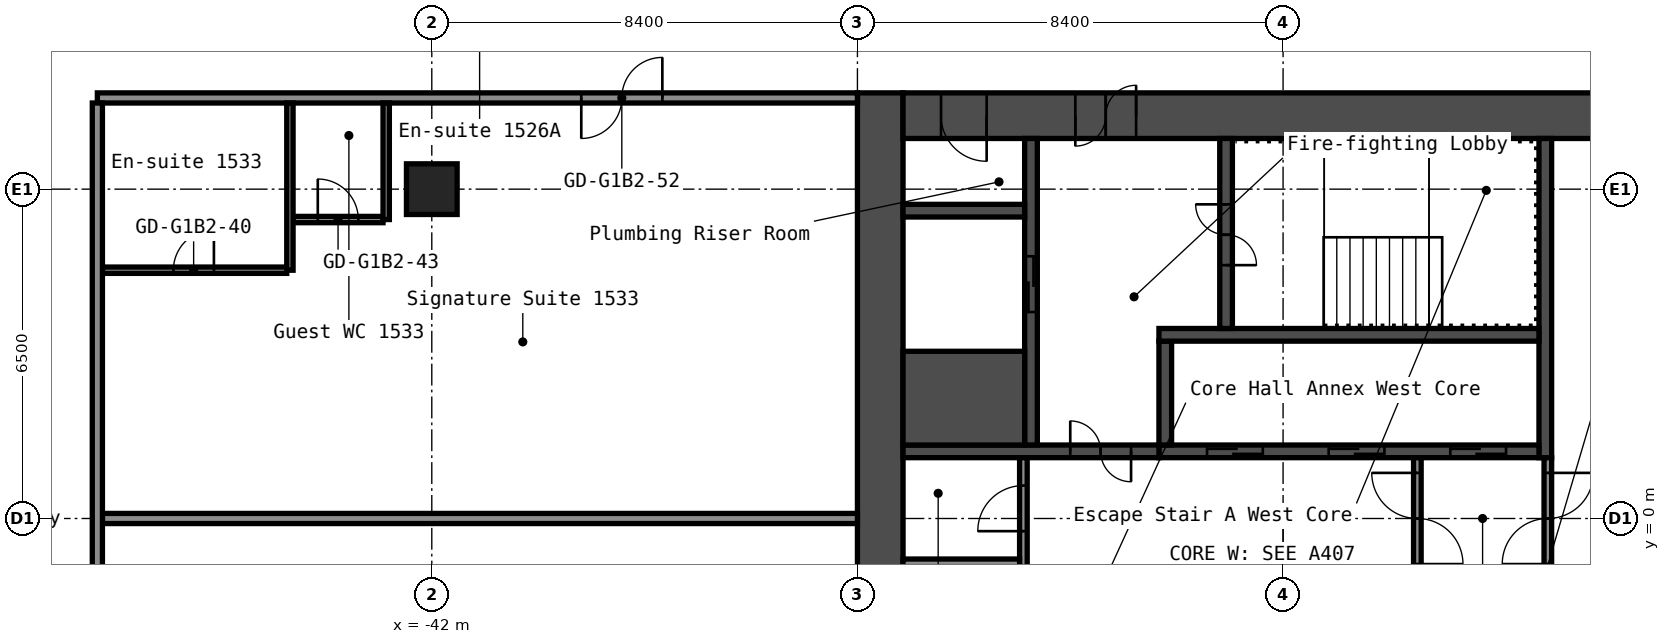
"""IFC4 building model, lengths in metres.
Left out: names, types, materials, properties, quantities, classifications, styles, units other than length and angle.
Written with IfcOpenShell. Run it as: python <this file> out.ifc"""

import sys

from ifc_helpers import new_model, si_unit, direction, frame, frame_2d, origin, origin_2d, place, context, subcontext, project, spatial, rectangle, hollow_rectangle, extrude, element, fill, save


model = new_model("IFC4")
c1 = context("Model", 3, precision=1e-05, world=origin(), true_north=direction((0.0, 1.0)))
c2 = subcontext(c1, "Body", "Model", "MODEL_VIEW")
j1 = project(units=[si_unit("LENGTHUNIT", "METRE"), si_unit("PLANEANGLEUNIT", "RADIAN")], contexts=[c1])
p1 = place(None, origin())
s1 = spatial("IfcSite", under=j1, at=p1, CompositionType="ELEMENT")
p2 = place(p1, origin())
s2 = spatial("IfcBuilding", under=s1, at=p2, CompositionType="ELEMENT")
p3 = place(p2, frame((0.0, 0.0, 55.0)))
s3 = spatial("IfcBuildingStorey", under=s2, at=p3, CompositionType="ELEMENT", Elevation=55.0)
p4 = place(p3, frame((-42.0, 6.5, 0.0), z_axis=(0.0, 0.0, 1.0), x_axis=(1.0, 0.0, 0.0)))
e1 = element("IfcColumn", 1, at=p4, inside=s3, PredefinedType="COLUMN", context=c2, shape_type="SweptSolid", body=[
    extrude(hollow_rectangle(XDim=1.0, YDim=1.0, WallThickness=0.04, at=origin_2d()), origin(), (0.0, 0.0, 1.0), 2.8),
])
p5 = place(p3, frame((-33.15, -8.4, 0.0), z_axis=(0.0, 0.0, 1.0), x_axis=(0.0, 1.0, 0.0)))
e2 = element("IfcWall", 2, at=p5, inside=s3, PredefinedType="SHEAR", context=c2, shape_type="SweptSolid", body=[
    extrude(rectangle(XDim=16.8, YDim=0.9, at=frame_2d((8.4, 0.0))), origin(), (0.0, 0.0, 1.0), 2.8),
])
p6 = place(p3, frame((-32.7, 7.95, 0.0), z_axis=(0.0, 0.0, 1.0), x_axis=(1.0, 0.0, 0.0)))
e3 = element("IfcWall", 3, at=p6, inside=s3, PredefinedType="SHEAR", context=c2, shape_type="SweptSolid", body=[
    extrude(rectangle(XDim=15.0, YDim=0.9, at=frame_2d((7.5, 0.0))), origin(), (0.0, 0.0, 1.0), 2.8),
])
p7 = place(p6, frame((3.4, 0.0, 0.0)))
e4 = element("IfcOpeningElement", 4, at=p7, cuts=e3, PredefinedType="OPENING", context=c2, shape_type="SweptSolid", body=[
    extrude(rectangle(XDim=1.2, YDim=2.1, at=frame_2d((0.6, 1.05))), frame((0.0, 0.46, 0.0), z_axis=(0.0, -1.0, 0.0), x_axis=(1.0, 0.0, 0.0)), (0.0, 0.0, 1.0), 0.92),
])
p8 = place(p6, frame((0.75, 0.0, 0.0)))
e5 = element("IfcOpeningElement", 5, at=p8, cuts=e3, PredefinedType="OPENING", context=c2, shape_type="SweptSolid", body=[
    extrude(rectangle(XDim=0.9, YDim=2.1, at=frame_2d((0.45, 1.05))), frame((0.0, 0.46, 0.0), z_axis=(0.0, -1.0, 0.0), x_axis=(1.0, 0.0, 0.0)), (0.0, 0.0, 1.0), 0.92),
])
p9 = place(p3, frame((-20.025, 1.2, 0.0), z_axis=(0.0, 0.0, 1.0), x_axis=(0.0, 1.0, 0.0)))
e6 = element("IfcWall", 6, at=p9, inside=s3, PredefinedType="SHEAR", context=c2, shape_type="SweptSolid", body=[
    extrude(rectangle(XDim=6.3, YDim=0.25, at=frame_2d((3.15, 0.0))), origin(), (0.0, 0.0, 1.0), 2.8),
])
p10 = place(p3, frame((-27.65, 1.325, 0.0), z_axis=(0.0, 0.0, 1.0), x_axis=(1.0, 0.0, 0.0)))
e7 = element("IfcWall", 7, at=p10, inside=s3, PredefinedType="SHEAR", context=c2, shape_type="SweptSolid", body=[
    extrude(rectangle(XDim=7.5, YDim=0.25, at=frame_2d((3.75, 0.0))), origin(), (0.0, 0.0, 1.0), 2.8),
])
p11 = place(p10, frame((5.75, 0.0, 0.0)))
e8 = element("IfcOpeningElement", 8, at=p11, cuts=e7, PredefinedType="OPENING", context=c2, shape_type="SweptSolid", body=[
    extrude(rectangle(XDim=1.1, YDim=2.1, at=frame_2d((0.55, 1.05))), frame((0.0, 0.135, 0.0), z_axis=(0.0, -1.0, 0.0), x_axis=(1.0, 0.0, 0.0)), (0.0, 0.0, 1.0), 0.27),
])
p12 = place(p10, frame((3.35, 0.0, 0.0)))
e9 = element("IfcOpeningElement", 9, at=p12, cuts=e7, PredefinedType="OPENING", context=c2, shape_type="SweptSolid", body=[
    extrude(rectangle(XDim=1.1, YDim=2.1, at=frame_2d((0.55, 1.05))), frame((0.0, 0.135, 0.0), z_axis=(0.0, -1.0, 0.0), x_axis=(1.0, 0.0, 0.0)), (0.0, 0.0, 1.0), 0.27),
])
p13 = place(p10, frame((0.95, 0.0, 0.0)))
e10 = element("IfcOpeningElement", 10, at=p13, cuts=e7, PredefinedType="OPENING", context=c2, shape_type="SweptSolid", body=[
    extrude(rectangle(XDim=1.1, YDim=2.1, at=frame_2d((0.55, 1.05))), frame((0.0, 0.135, 0.0), z_axis=(0.0, -1.0, 0.0), x_axis=(1.0, 0.0, 0.0)), (0.0, 0.0, 1.0), 0.27),
])
p14 = place(p3, frame((-27.525, 1.45, 0.0), z_axis=(0.0, 0.0, 1.0), x_axis=(0.0, 1.0, 0.0)))
e11 = element("IfcWall", 11, at=p14, inside=s3, PredefinedType="SHEAR", context=c2, shape_type="SweptSolid", body=[
    extrude(rectangle(XDim=2.05, YDim=0.25, at=frame_2d((1.025, 0.0))), origin(), (0.0, 0.0, 1.0), 2.8),
])
p15 = place(p3, frame((-27.65, 3.625, 0.0), z_axis=(0.0, 0.0, 1.0), x_axis=(1.0, 0.0, 0.0)))
e12 = element("IfcWall", 12, at=p15, inside=s3, PredefinedType="SHEAR", context=c2, shape_type="SweptSolid", body=[
    extrude(rectangle(XDim=7.5, YDim=0.25, at=frame_2d((3.75, 0.0))), origin(), (0.0, 0.0, 1.0), 2.8),
])
p16 = place(p3, frame((-26.325, 3.75, 0.0), z_axis=(0.0, 0.0, 1.0), x_axis=(0.0, 1.0, 0.0)))
e13 = element("IfcWall", 13, at=p16, inside=s3, PredefinedType="SHEAR", context=c2, shape_type="SweptSolid", body=[
    extrude(rectangle(XDim=3.75, YDim=0.25, at=frame_2d((1.875, 0.0))), origin(), (0.0, 0.0, 1.0), 2.8),
])
p17 = place(p16, frame((1.25, 0.0, 0.0)))
e14 = element("IfcOpeningElement", 14, at=p17, cuts=e13, PredefinedType="OPENING", context=c2, shape_type="SweptSolid", body=[
    extrude(rectangle(XDim=1.2, YDim=2.1, at=frame_2d((0.6, 1.05))), frame((0.0, 0.135, 0.0), z_axis=(0.0, -1.0, 0.0), x_axis=(1.0, 0.0, 0.0)), (0.0, 0.0, 1.0), 0.27),
])
p18 = place(p3, frame((-32.7, 1.325, 0.0), z_axis=(0.0, 0.0, 1.0), x_axis=(1.0, 0.0, 0.0)))
e15 = element("IfcWall", 15, at=p18, inside=s3, PredefinedType="SHEAR", context=c2, shape_type="SweptSolid", body=[
    extrude(rectangle(XDim=5.05, YDim=0.25, at=frame_2d((2.525, 0.0))), origin(), (0.0, 0.0, 1.0), 2.8),
])
p19 = place(p18, frame((3.3, 0.0, 0.0)))
e16 = element("IfcOpeningElement", 16, at=p19, cuts=e15, PredefinedType="OPENING", context=c2, shape_type="SweptSolid", body=[
    extrude(rectangle(XDim=1.2, YDim=2.1, at=frame_2d((0.6, 1.05))), frame((0.0, 0.135, 0.0), z_axis=(0.0, -1.0, 0.0), x_axis=(1.0, 0.0, 0.0)), (0.0, 0.0, 1.0), 0.27),
])
p20 = place(p3, frame((-30.175, 1.45, 0.0), z_axis=(0.0, 0.0, 1.0), x_axis=(0.0, 1.0, 0.0)))
e17 = element("IfcWall", 17, at=p20, inside=s3, PredefinedType="SHEAR", context=c2, shape_type="SweptSolid", body=[
    extrude(rectangle(XDim=6.05, YDim=0.25, at=frame_2d((3.025, 0.0))), origin(), (0.0, 0.0, 1.0), 2.8),
])
p21 = place(p20, frame((2.625, 0.0, 0.0)))
e18 = element("IfcOpeningElement", 18, at=p21, cuts=e17, PredefinedType="OPENING", context=c2, shape_type="SweptSolid", body=[
    extrude(rectangle(XDim=1.1, YDim=2.1, at=frame_2d((0.55, 1.05))), frame((0.0, 0.135, 0.0), z_axis=(0.0, -1.0, 0.0), x_axis=(1.0, 0.0, 0.0)), (0.0, 0.0, 1.0), 0.27),
])
p22 = place(p3, frame((-32.7, 2.375, 0.0), z_axis=(0.0, 0.0, 1.0), x_axis=(1.0, 0.0, 0.0)))
e19 = element("IfcWall", 19, at=p22, inside=s3, PredefinedType="SHEAR", context=c2, shape_type="SweptSolid", body=[
    extrude(rectangle(XDim=2.4, YDim=1.85, at=frame_2d((1.2, 0.0))), origin(), (0.0, 0.0, 1.0), 2.8),
])
p23 = place(p3, frame((-32.7, 6.075, 0.0), z_axis=(0.0, 0.0, 1.0), x_axis=(1.0, 0.0, 0.0)))
e20 = element("IfcWall", 20, at=p23, inside=s3, PredefinedType="SHEAR", context=c2, shape_type="SweptSolid", body=[
    extrude(rectangle(XDim=2.4, YDim=0.25, at=frame_2d((1.2, 0.0))), origin(), (0.0, 0.0, 1.0), 2.8),
])
p24 = place(p3, frame((-19.975, -1.2, 0.0), z_axis=(0.0, 0.0, 1.0), x_axis=(0.0, 1.0, 0.0)))
e21 = element("IfcWall", 21, at=p24, inside=s3, PredefinedType="PARTITIONING", context=c2, shape_type="SweptSolid", body=[
    extrude(rectangle(XDim=2.4, YDim=0.15, at=frame_2d((1.2, 0.0))), origin(), (0.0, 0.0, 1.0), 2.8),
])
p25 = place(p24, frame((0.3, 0.0, 0.0)))
e22 = element("IfcOpeningElement", 22, at=p25, cuts=e21, PredefinedType="OPENING", context=c2, shape_type="SweptSolid", body=[
    extrude(rectangle(XDim=1.8, YDim=2.1, at=frame_2d((0.9, 1.05))), frame((0.0, 0.085, 0.0), z_axis=(0.0, -1.0, 0.0), x_axis=(1.0, 0.0, 0.0)), (0.0, 0.0, 1.0), 0.17),
])
p26 = place(p3, frame((-22.55, -1.2, 0.0), z_axis=(0.0, 0.0, 1.0), x_axis=(0.0, 1.0, 0.0)))
e23 = element("IfcWall", 23, at=p26, inside=s3, PredefinedType="PARTITIONING", context=c2, shape_type="SweptSolid", body=[
    extrude(rectangle(XDim=2.4, YDim=0.15, at=frame_2d((1.2, 0.0))), origin(), (0.0, 0.0, 1.0), 2.8),
])
p27 = place(p26, frame((0.3, 0.0, 0.0)))
e24 = element("IfcOpeningElement", 24, at=p27, cuts=e23, PredefinedType="OPENING", context=c2, shape_type="SweptSolid", body=[
    extrude(rectangle(XDim=1.8, YDim=2.1, at=frame_2d((0.9, 1.05))), frame((0.0, 0.085, 0.0), z_axis=(0.0, -1.0, 0.0), x_axis=(1.0, 0.0, 0.0)), (0.0, 0.0, 1.0), 0.17),
])
p28 = place(p3, frame((-30.325, -0.95, 0.0), z_axis=(0.0, 0.0, 1.0), x_axis=(0.0, 1.0, 0.0)))
e25 = element("IfcWall", 25, at=p28, inside=s3, PredefinedType="PARTITIONING", context=c2, shape_type="SweptSolid", body=[
    extrude(rectangle(XDim=2.15, YDim=0.15, at=frame_2d((1.075, 0.0))), origin(), (0.0, 0.0, 1.0), 2.8),
])
p29 = place(p28, frame((0.7, 0.0, 0.0)))
e26 = element("IfcOpeningElement", 26, at=p29, cuts=e25, PredefinedType="OPENING", context=c2, shape_type="SweptSolid", body=[
    extrude(rectangle(XDim=0.9, YDim=2.1, at=frame_2d((0.45, 1.05))), frame((0.0, 0.085, 0.0), z_axis=(0.0, -1.0, 0.0), x_axis=(1.0, 0.0, 0.0)), (0.0, 0.0, 1.0), 0.17),
])
p30 = place(p3, frame((-32.7, -0.875, 0.0), z_axis=(0.0, 0.0, 1.0), x_axis=(1.0, 0.0, 0.0)))
e27 = element("IfcWall", 27, at=p30, inside=s3, PredefinedType="PARTITIONING", context=c2, shape_type="SweptSolid", body=[
    extrude(rectangle(XDim=2.3, YDim=0.15, at=frame_2d((1.15, 0.0))), origin(), (0.0, 0.0, 1.0), 2.8),
])
p31 = place(p3, frame((-48.5, 0.0, 0.0), z_axis=(0.0, 0.0, 1.0), x_axis=(1.0, 0.0, 0.0)))
e28 = element("IfcWall", 28, at=p31, inside=s3, PredefinedType="PARTITIONING", context=c2, shape_type="SweptSolid", body=[
    extrude(rectangle(XDim=14.9, YDim=0.2, at=frame_2d((7.45, 0.0))), origin(), (0.0, 0.0, 1.0), 2.8),
])
p32 = place(p3, frame((-48.5, 4.9, 0.0), z_axis=(0.0, 0.0, 1.0), x_axis=(1.0, 0.0, 0.0)))
e29 = element("IfcWall", 29, at=p32, inside=s3, PredefinedType="PARTITIONING", context=c2, shape_type="SweptSolid", body=[
    extrude(rectangle(XDim=3.637, YDim=0.125, at=frame_2d((1.819, 0.0))), origin(), (0.0, 0.0, 1.0), 2.8),
])
p33 = place(p32, frame((1.4, 0.0, 0.0)))
e30 = element("IfcOpeningElement", 30, at=p33, cuts=e29, PredefinedType="OPENING", context=c2, shape_type="SweptSolid", body=[
    extrude(rectangle(XDim=0.8, YDim=2.1, at=frame_2d((0.4, 1.05))), frame((0.0, 0.073, 0.0), z_axis=(0.0, -1.0, 0.0), x_axis=(1.0, 0.0, 0.0)), (0.0, 0.0, 1.0), 0.145),
])
p34 = place(p3, frame((-44.738, 5.9, 0.0), z_axis=(0.0, 0.0, 1.0), x_axis=(1.0, 0.0, 0.0)))
e31 = element("IfcWall", 31, at=p34, inside=s3, PredefinedType="PARTITIONING", context=c2, shape_type="SweptSolid", body=[
    extrude(rectangle(XDim=1.775, YDim=0.125, at=frame_2d((0.888, 0.0))), origin(), (0.0, 0.0, 1.0), 2.8),
])
p35 = place(p34, frame((0.488, 0.0, 0.0)))
e32 = element("IfcOpeningElement", 32, at=p35, cuts=e31, PredefinedType="OPENING", context=c2, shape_type="SweptSolid", body=[
    extrude(rectangle(XDim=0.8, YDim=2.1, at=frame_2d((0.4, 1.05))), frame((0.0, 0.073, 0.0), z_axis=(0.0, -1.0, 0.0), x_axis=(1.0, 0.0, 0.0)), (0.0, 0.0, 1.0), 0.145),
])
p36 = place(p3, frame((-48.6, 8.3, 0.0), z_axis=(0.0, 0.0, 1.0), x_axis=(1.0, 0.0, 0.0)))
e33 = element("IfcWall", 33, at=p36, inside=s3, PredefinedType="PARTITIONING", context=c2, shape_type="SweptSolid", body=[
    extrude(rectangle(XDim=15.0, YDim=0.2, at=frame_2d((7.5, 0.0))), origin(), (0.0, 0.0, 1.0), 2.8),
])
p37 = place(p36, frame((9.55, 0.0, 0.0)))
e34 = element("IfcOpeningElement", 34, at=p37, cuts=e33, PredefinedType="OPENING", context=c2, shape_type="SweptSolid", body=[
    extrude(rectangle(XDim=1.6, YDim=2.1, at=frame_2d((0.8, 1.05))), frame((0.0, 0.11, 0.0), z_axis=(0.0, -1.0, 0.0), x_axis=(1.0, 0.0, 0.0)), (0.0, 0.0, 1.0), 0.22),
])
p38 = place(p3, frame((-48.6, -8.2, 0.0), z_axis=(0.0, 0.0, 1.0), x_axis=(0.0, 1.0, 0.0)))
e35 = element("IfcWall", 35, at=p38, inside=s3, PredefinedType="PARTITIONING", context=c2, shape_type="SweptSolid", body=[
    extrude(rectangle(XDim=16.4, YDim=0.2, at=frame_2d((8.2, 0.0))), origin(), (0.0, 0.0, 1.0), 2.8),
])
p39 = place(p3, frame((-44.8, 4.9, 0.0), z_axis=(0.0, 0.0, 1.0), x_axis=(0.0, 1.0, 0.0)))
e36 = element("IfcWall", 36, at=p39, inside=s3, PredefinedType="PARTITIONING", context=c2, shape_type="SweptSolid", body=[
    extrude(rectangle(XDim=3.3, YDim=0.125, at=frame_2d((1.65, 0.0))), origin(), (0.0, 0.0, 1.0), 2.8),
])
p40 = place(p3, frame((-42.9, 5.9, 0.0), z_axis=(0.0, 0.0, 1.0), x_axis=(0.0, 1.0, 0.0)))
e37 = element("IfcWall", 37, at=p40, inside=s3, PredefinedType="PARTITIONING", context=c2, shape_type="SweptSolid", body=[
    extrude(rectangle(XDim=2.3, YDim=0.125, at=frame_2d((1.15, 0.0))), origin(), (0.0, 0.0, 1.0), 2.8),
])
p41 = place(p7, origin())
e38 = element("IfcDoor", 38, at=p41, inside=s3, OperationType="DOUBLE_DOOR_SINGLE_SWING", PredefinedType="DOOR", context=c2, shape_type="SweptSolid", body=[
    extrude(rectangle(XDim=1.2, YDim=2.1, at=frame_2d((0.6, 1.05))), frame((0.0, 0.025, 0.0), z_axis=(0.0, -1.0, 0.0), x_axis=(1.0, 0.0, 0.0)), (0.0, 0.0, 1.0), 0.05),
])
fill(e4, e38)
p42 = place(p8, origin())
e39 = element("IfcDoor", 39, at=p42, inside=s3, OperationType="SINGLE_SWING_RIGHT", PredefinedType="DOOR", context=c2, shape_type="SweptSolid", body=[
    extrude(rectangle(XDim=0.9, YDim=2.1, at=frame_2d((0.45, 1.05))), frame((0.0, 0.025, 0.0), z_axis=(0.0, -1.0, 0.0), x_axis=(1.0, 0.0, 0.0)), (0.0, 0.0, 1.0), 0.05),
])
fill(e5, e39)
p43 = place(p17, origin())
e40 = element("IfcDoor", 40, at=p43, inside=s3, OperationType="DOUBLE_DOOR_SINGLE_SWING", PredefinedType="DOOR", context=c2, shape_type="SweptSolid", body=[
    extrude(rectangle(XDim=1.2, YDim=2.1, at=frame_2d((0.6, 1.05))), frame((0.0, 0.025, 0.0), z_axis=(0.0, -1.0, 0.0), x_axis=(1.0, 0.0, 0.0)), (0.0, 0.0, 1.0), 0.05),
])
fill(e14, e40)
p44 = place(p19, origin())
e41 = element("IfcDoor", 41, at=p44, inside=s3, OperationType="DOUBLE_DOOR_SINGLE_SWING", PredefinedType="DOOR", context=c2, shape_type="SweptSolid", body=[
    extrude(rectangle(XDim=1.2, YDim=2.1, at=frame_2d((0.6, 1.05))), frame((0.0, 0.025, 0.0), z_axis=(0.0, -1.0, 0.0), x_axis=(1.0, 0.0, 0.0)), (0.0, 0.0, 1.0), 0.05),
])
fill(e16, e41)
p45 = place(p25, origin())
e42 = element("IfcDoor", 42, at=p45, inside=s3, OperationType="DOUBLE_DOOR_SINGLE_SWING", PredefinedType="DOOR", context=c2, shape_type="SweptSolid", body=[
    extrude(rectangle(XDim=1.8, YDim=2.1, at=frame_2d((0.9, 1.05))), frame((0.0, 0.025, 0.0), z_axis=(0.0, -1.0, 0.0), x_axis=(1.0, 0.0, 0.0)), (0.0, 0.0, 1.0), 0.05),
])
fill(e22, e42)
p46 = place(p27, origin())
e43 = element("IfcDoor", 43, at=p46, inside=s3, OperationType="DOUBLE_DOOR_SINGLE_SWING", PredefinedType="DOOR", context=c2, shape_type="SweptSolid", body=[
    extrude(rectangle(XDim=1.8, YDim=2.1, at=frame_2d((0.9, 1.05))), frame((0.0, 0.025, 0.0), z_axis=(0.0, -1.0, 0.0), x_axis=(1.0, 0.0, 0.0)), (0.0, 0.0, 1.0), 0.05),
])
fill(e24, e43)
p47 = place(p29, origin())
e44 = element("IfcDoor", 44, at=p47, inside=s3, OperationType="SINGLE_SWING_RIGHT", PredefinedType="DOOR", context=c2, shape_type="SweptSolid", body=[
    extrude(rectangle(XDim=0.9, YDim=2.1, at=frame_2d((0.45, 1.05))), frame((0.0, 0.025, 0.0), z_axis=(0.0, -1.0, 0.0), x_axis=(1.0, 0.0, 0.0)), (0.0, 0.0, 1.0), 0.05),
])
fill(e26, e44)
p48 = place(p11, origin())
e45 = element("IfcDoor", 45, at=p48, inside=s3, OperationType="DOUBLE_DOOR_SLIDING", PredefinedType="DOOR", context=c2, shape_type="SweptSolid", body=[
    extrude(rectangle(XDim=1.1, YDim=2.1, at=frame_2d((0.55, 1.05))), frame((0.0, 0.025, 0.0), z_axis=(0.0, -1.0, 0.0), x_axis=(1.0, 0.0, 0.0)), (0.0, 0.0, 1.0), 0.05),
])
fill(e8, e45)
p49 = place(p12, origin())
e46 = element("IfcDoor", 46, at=p49, inside=s3, OperationType="DOUBLE_DOOR_SLIDING", PredefinedType="DOOR", context=c2, shape_type="SweptSolid", body=[
    extrude(rectangle(XDim=1.1, YDim=2.1, at=frame_2d((0.55, 1.05))), frame((0.0, 0.025, 0.0), z_axis=(0.0, -1.0, 0.0), x_axis=(1.0, 0.0, 0.0)), (0.0, 0.0, 1.0), 0.05),
])
fill(e9, e46)
p50 = place(p13, origin())
e47 = element("IfcDoor", 47, at=p50, inside=s3, OperationType="DOUBLE_DOOR_SLIDING", PredefinedType="DOOR", context=c2, shape_type="SweptSolid", body=[
    extrude(rectangle(XDim=1.1, YDim=2.1, at=frame_2d((0.55, 1.05))), frame((0.0, 0.025, 0.0), z_axis=(0.0, -1.0, 0.0), x_axis=(1.0, 0.0, 0.0)), (0.0, 0.0, 1.0), 0.05),
])
fill(e10, e47)
p51 = place(p21, origin())
e48 = element("IfcDoor", 48, at=p51, inside=s3, OperationType="DOUBLE_DOOR_SLIDING", PredefinedType="DOOR", context=c2, shape_type="SweptSolid", body=[
    extrude(rectangle(XDim=1.1, YDim=2.1, at=frame_2d((0.55, 1.05))), frame((0.0, 0.025, 0.0), z_axis=(0.0, -1.0, 0.0), x_axis=(1.0, 0.0, 0.0)), (0.0, 0.0, 1.0), 0.05),
])
fill(e18, e48)
p52 = place(p33, origin())
e49 = element("IfcDoor", 49, at=p52, inside=s3, OperationType="SINGLE_SWING_LEFT", PredefinedType="DOOR", context=c2, shape_type="SweptSolid", body=[
    extrude(rectangle(XDim=0.8, YDim=2.1, at=frame_2d((0.4, 1.05))), frame((0.0, 0.025, 0.0), z_axis=(0.0, -1.0, 0.0), x_axis=(1.0, 0.0, 0.0)), (0.0, 0.0, 1.0), 0.05),
])
fill(e30, e49)
p53 = place(p35, origin())
e50 = element("IfcDoor", 50, at=p53, inside=s3, OperationType="SINGLE_SWING_RIGHT", PredefinedType="DOOR", context=c2, shape_type="SweptSolid", body=[
    extrude(rectangle(XDim=0.8, YDim=2.1, at=frame_2d((0.4, 1.05))), frame((0.0, 0.025, 0.0), z_axis=(0.0, -1.0, 0.0), x_axis=(1.0, 0.0, 0.0)), (0.0, 0.0, 1.0), 0.05),
])
fill(e32, e50)
p54 = place(p37, origin())
e51 = element("IfcDoor", 51, at=p54, inside=s3, OperationType="DOUBLE_DOOR_SINGLE_SWING", PredefinedType="DOOR", context=c2, shape_type="SweptSolid", body=[
    extrude(rectangle(XDim=1.6, YDim=2.1, at=frame_2d((0.8, 1.05))), frame((0.0, 0.025, 0.0), z_axis=(0.0, -1.0, 0.0), x_axis=(1.0, 0.0, 0.0)), (0.0, 0.0, 1.0), 0.05),
])
fill(e34, e51)
save(model, sys.argv[1])
